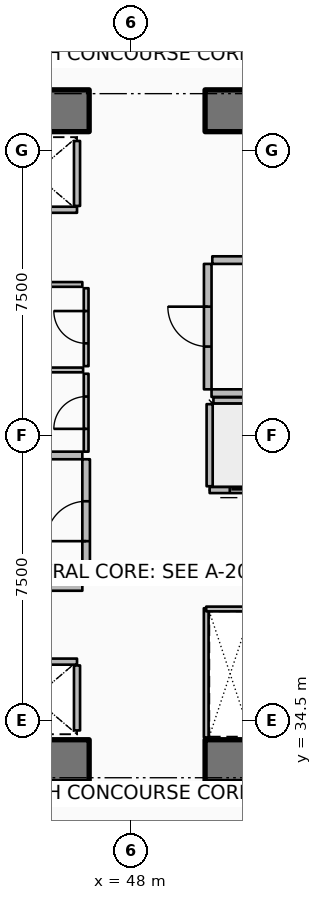
"""IFC4 building model, lengths in metres.
Left out: names, types, materials, properties, quantities, classifications, styles, units other than length and angle.
Written with IfcOpenShell. Run it as: python <this file> out.ifc"""

import sys

from ifc_helpers import new_model, si_unit, direction, frame, frame_2d, origin, place, context, subcontext, project, spatial, rectangle, extrude, element, fill, save


model = new_model("IFC4")
c1 = context("Model", 3, precision=1e-05, world=origin(), true_north=direction((0.0, 1.0)))
c2 = subcontext(c1, "Body", "Model", "MODEL_VIEW")
j1 = project(units=[si_unit("LENGTHUNIT", "METRE"), si_unit("PLANEANGLEUNIT", "RADIAN")], contexts=[c1])
p1 = place(None, origin())
s1 = spatial("IfcSite", under=j1, at=p1, CompositionType="ELEMENT")
p2 = place(p1, origin())
s2 = spatial("IfcBuilding", under=s1, at=p2, CompositionType="ELEMENT")
p3 = place(p2, frame((0.0, 0.0, 12.0)))
s3 = spatial("IfcBuildingStorey", under=s2, at=p3, CompositionType="ELEMENT", Elevation=12.0)
for number, where, z_axis, x_axis in (
    (1, (36.7, 33.45, 0.0), (0.0, 0.0, 1.0), (1.0, 0.0, 0.0)),
    (2, (49.95, 33.45, 0.0), (0.0, 0.0, 1.0), (1.0, 0.0, 0.0)),
    (3, (36.7, 50.55, 0.0), (0.0, 0.0, 1.0), (1.0, 0.0, 0.0)),
    (4, (49.95, 50.55, 0.0), (0.0, 0.0, 1.0), (1.0, 0.0, 0.0)),
):
    element("IfcWall", number, at=place(p3, frame(where, z_axis=z_axis, x_axis=x_axis)), inside=s3, PredefinedType="SHEAR", context=c2, shape_type="SweptSolid", body=[
        extrude(rectangle(XDim=10.2, YDim=1.1, at=frame_2d((5.1, 0.0))), origin(), (0.0, 0.0, 1.0), 4.8),
    ])
p4 = place(p3, frame((46.58, 47.945, 0.0), z_axis=(0.0, 0.0, 1.0), x_axis=(-1.0, 0.0, 0.0)))
e5 = element("IfcWall", 5, at=p4, inside=s3, PredefinedType="PARTITIONING", context=c2, shape_type="SweptSolid", body=[
    extrude(rectangle(XDim=2.26, YDim=0.16, at=frame_2d((1.13, 0.0))), origin(), (0.0, 0.0, 1.0), 4.48),
])
p5 = place(p3, frame((46.58, 48.045, 0.0), z_axis=(0.0, 0.0, 1.0), x_axis=(0.0, 1.0, 0.0)))
e6 = element("IfcWall", 6, at=p5, inside=s3, PredefinedType="PARTITIONING", context=c2, shape_type="SweptSolid", body=[
    extrude(rectangle(XDim=1.71, YDim=0.16, at=frame_2d((0.855, 0.0))), origin(), (0.0, 0.0, 1.0), 4.48),
])
p6 = place(p3, frame((44.32, 36.055, 0.0), z_axis=(0.0, 0.0, 1.0), x_axis=(1.0, 0.0, 0.0)))
e7 = element("IfcWall", 7, at=p6, inside=s3, PredefinedType="PARTITIONING", context=c2, shape_type="SweptSolid", body=[
    extrude(rectangle(XDim=2.26, YDim=0.16, at=frame_2d((1.13, 0.0))), origin(), (0.0, 0.0, 1.0), 4.48),
])
p7 = place(p3, frame((46.58, 34.245, 0.0), z_axis=(0.0, 0.0, 1.0), x_axis=(0.0, 1.0, 0.0)))
e8 = element("IfcWall", 8, at=p7, inside=s3, PredefinedType="PARTITIONING", context=c2, shape_type="SweptSolid", body=[
    extrude(rectangle(XDim=1.71, YDim=0.16, at=frame_2d((0.855, 0.0))), origin(), (0.0, 0.0, 1.0), 4.48),
])
p8 = place(p3, frame((52.23, 40.57, 0.0), z_axis=(0.0, 0.0, 1.0), x_axis=(-1.0, 0.0, 0.0)))
e9 = element("IfcWall", 9, at=p8, inside=s3, PredefinedType="PARTITIONING", context=c2, shape_type="SweptSolid", body=[
    extrude(rectangle(XDim=2.16, YDim=0.16, at=frame_2d((1.08, 0.0))), origin(), (0.0, 0.0, 1.0), 4.48),
])
p9 = place(p8, frame((0.53, 0.0, 0.0)))
e10 = element("IfcOpeningElement", 10, at=p9, cuts=e9, PredefinedType="OPENING", context=c2, shape_type="SweptSolid", body=[
    extrude(rectangle(XDim=1.1, YDim=2.1, at=frame_2d((0.55, 1.05))), frame((0.0, 0.09, 0.0), z_axis=(0.0, -1.0, 0.0), x_axis=(1.0, 0.0, 0.0)), (0.0, 0.0, 1.0), 0.18),
])
p10 = place(p3, frame((50.07, 40.67, 0.0), z_axis=(0.0, 0.0, 1.0), x_axis=(0.0, 1.0, 0.0)))
e11 = element("IfcWall", 11, at=p10, inside=s3, PredefinedType="PARTITIONING", context=c2, shape_type="SweptSolid", body=[
    extrude(rectangle(XDim=2.16, YDim=0.16, at=frame_2d((1.08, 0.0))), origin(), (0.0, 0.0, 1.0), 4.48),
])
p11 = place(p3, frame((50.17, 42.93, 0.0), z_axis=(0.0, 0.0, 1.0), x_axis=(1.0, 0.0, 0.0)))
e12 = element("IfcWall", 12, at=p11, inside=s3, PredefinedType="PARTITIONING", context=c2, shape_type="SweptSolid", body=[
    extrude(rectangle(XDim=1.96, YDim=0.16, at=frame_2d((0.98, 0.0))), origin(), (0.0, 0.0, 1.0), 4.48),
])
p12 = place(p3, frame((41.35, 38.02, 0.0), z_axis=(0.0, 0.0, 1.0), x_axis=(1.0, 0.0, 0.0)))
e13 = element("IfcWall", 13, at=p12, inside=s3, PredefinedType="PARTITIONING", context=c2, shape_type="SweptSolid", body=[
    extrude(rectangle(XDim=5.37, YDim=0.2, at=frame_2d((2.685, 0.0))), origin(), (0.0, 0.0, 1.0), 4.48),
])
p13 = place(p3, frame((43.92, 41.48, 0.0), z_axis=(0.0, 0.0, 1.0), x_axis=(1.0, 0.0, 0.0)))
e14 = element("IfcWall", 14, at=p13, inside=s3, PredefinedType="PARTITIONING", context=c2, shape_type="SweptSolid", body=[
    extrude(rectangle(XDim=2.8, YDim=0.2, at=frame_2d((1.4, 0.0))), origin(), (0.0, 0.0, 1.0), 4.48),
])
p14 = place(p3, frame((46.82, 38.12, 0.0), z_axis=(0.0, 0.0, 1.0), x_axis=(0.0, 1.0, 0.0)))
e15 = element("IfcWall", 15, at=p14, inside=s3, PredefinedType="PARTITIONING", context=c2, shape_type="SweptSolid", body=[
    extrude(rectangle(XDim=3.26, YDim=0.2, at=frame_2d((1.63, 0.0))), origin(), (0.0, 0.0, 1.0), 4.48),
])
p15 = place(p14, frame((1.105, 0.0, 0.0)))
e16 = element("IfcOpeningElement", 16, at=p15, cuts=e15, PredefinedType="OPENING", context=c2, shape_type="SweptSolid", body=[
    extrude(rectangle(XDim=1.05, YDim=2.1, at=frame_2d((0.525, 1.05))), frame((0.0, 0.11, 0.0), z_axis=(0.0, -1.0, 0.0), x_axis=(1.0, 0.0, 0.0)), (0.0, 0.0, 1.0), 0.22),
])
p16 = place(p3, frame((50.12, 43.12, 0.0), z_axis=(0.0, 0.0, 1.0), x_axis=(1.0, 0.0, 0.0)))
e17 = element("IfcWall", 17, at=p16, inside=s3, PredefinedType="PARTITIONING", context=c2, shape_type="SweptSolid", body=[
    extrude(rectangle(XDim=8.88, YDim=0.2, at=frame_2d((4.44, 0.0))), origin(), (0.0, 0.0, 1.0), 4.48),
])
p17 = place(p3, frame((50.14, 46.62, 0.0), z_axis=(0.0, 0.0, 1.0), x_axis=(1.0, 0.0, 0.0)))
e18 = element("IfcWall", 18, at=p17, inside=s3, PredefinedType="PARTITIONING", context=c2, shape_type="SweptSolid", body=[
    extrude(rectangle(XDim=1.02, YDim=0.2, at=frame_2d((0.51, 0.0))), origin(), (0.0, 0.0, 1.0), 4.48),
])
p18 = place(p3, frame((50.02, 43.22, 0.0), z_axis=(0.0, 0.0, 1.0), x_axis=(0.0, 1.0, 0.0)))
e19 = element("IfcWall", 19, at=p18, inside=s3, PredefinedType="PARTITIONING", context=c2, shape_type="SweptSolid", body=[
    extrude(rectangle(XDim=3.3, YDim=0.2, at=frame_2d((1.65, 0.0))), origin(), (0.0, 0.0, 1.0), 4.48),
])
p19 = place(p18, frame((1.125, 0.0, 0.0)))
e20 = element("IfcOpeningElement", 20, at=p19, cuts=e19, PredefinedType="OPENING", context=c2, shape_type="SweptSolid", body=[
    extrude(rectangle(XDim=1.05, YDim=2.1, at=frame_2d((0.525, 1.05))), frame((0.0, 0.11, 0.0), z_axis=(0.0, -1.0, 0.0), x_axis=(1.0, 0.0, 0.0)), (0.0, 0.0, 1.0), 0.22),
])
p20 = place(p3, frame((41.36, 45.98, 0.0), z_axis=(0.0, 0.0, 1.0), x_axis=(1.0, 0.0, 0.0)))
e21 = element("IfcWall", 21, at=p20, inside=s3, PredefinedType="PARTITIONING", context=c2, shape_type="SweptSolid", body=[
    extrude(rectangle(XDim=5.36, YDim=0.125, at=frame_2d((2.68, 0.0))), origin(), (0.0, 0.0, 1.0), 3.92),
])
p21 = place(p3, frame((49.98, 34.06, 0.0), z_axis=(0.0, 0.0, 1.0), x_axis=(0.0, 1.0, 0.0)))
e22 = element("IfcWall", 22, at=p21, inside=s3, PredefinedType="PARTITIONING", context=c2, shape_type="SweptSolid", body=[
    extrude(rectangle(XDim=3.4, YDim=0.125, at=frame_2d((1.7, 0.0))), origin(), (0.0, 0.0, 1.0), 3.92),
])
p22 = place(p3, frame((49.98, 37.44, 0.0), z_axis=(0.0, 0.0, 1.0), x_axis=(1.0, 0.0, 0.0)))
e23 = element("IfcWall", 23, at=p22, inside=s3, PredefinedType="PARTITIONING", context=c2, shape_type="SweptSolid", body=[
    extrude(rectangle(XDim=1.26, YDim=0.125, at=frame_2d((0.63, 0.0))), origin(), (0.0, 0.0, 1.0), 3.92),
])
p23 = place(p3, frame((44.03, 43.73, 0.0), z_axis=(0.0, 0.0, 1.0), x_axis=(1.0, 0.0, 0.0)))
e24 = element("IfcWall", 24, at=p23, inside=s3, PredefinedType="PARTITIONING", context=c2, shape_type="SweptSolid", body=[
    extrude(rectangle(XDim=2.71, YDim=0.125, at=frame_2d((1.355, 0.0))), origin(), (0.0, 0.0, 1.0), 3.92),
])
p24 = place(p3, frame((46.82, 41.58, 0.0), z_axis=(0.0, 0.0, 1.0), x_axis=(0.0, 1.0, 0.0)))
e25 = element("IfcWall", 25, at=p24, inside=s3, PredefinedType="PARTITIONING", context=c2, shape_type="SweptSolid", body=[
    extrude(rectangle(XDim=2.05, YDim=0.125, at=frame_2d((1.025, 0.0))), origin(), (0.0, 0.0, 1.0), 3.92),
])
p25 = place(p24, frame((0.6, 0.0, 0.0)))
e26 = element("IfcOpeningElement", 26, at=p25, cuts=e25, PredefinedType="OPENING", context=c2, shape_type="SweptSolid", body=[
    extrude(rectangle(XDim=0.85, YDim=2.06, at=frame_2d((0.425, 1.03))), frame((0.0, 0.073, 0.0), z_axis=(0.0, -1.0, 0.0), x_axis=(1.0, 0.0, 0.0)), (0.0, 0.0, 1.0), 0.145),
])
p26 = place(p3, frame((46.82, 43.83, 0.0), z_axis=(0.0, 0.0, 1.0), x_axis=(0.0, 1.0, 0.0)))
e27 = element("IfcWall", 27, at=p26, inside=s3, PredefinedType="PARTITIONING", context=c2, shape_type="SweptSolid", body=[
    extrude(rectangle(XDim=2.05, YDim=0.125, at=frame_2d((1.025, 0.0))), origin(), (0.0, 0.0, 1.0), 3.92),
])
p27 = place(p26, frame((0.6, 0.0, 0.0)))
e28 = element("IfcOpeningElement", 28, at=p27, cuts=e27, PredefinedType="OPENING", context=c2, shape_type="SweptSolid", body=[
    extrude(rectangle(XDim=0.85, YDim=2.06, at=frame_2d((0.425, 1.03))), frame((0.0, 0.073, 0.0), z_axis=(0.0, -1.0, 0.0), x_axis=(1.0, 0.0, 0.0)), (0.0, 0.0, 1.0), 0.145),
])
p28 = place(p9, origin())
e29 = element("IfcDoor", 29, at=p28, inside=s3, OperationType="DOUBLE_DOOR_SLIDING", PredefinedType="DOOR", context=c2, shape_type="SweptSolid", body=[
    extrude(rectangle(XDim=1.1, YDim=2.1, at=frame_2d((0.55, 1.05))), frame((0.0, 0.025, 0.0), z_axis=(0.0, -1.0, 0.0), x_axis=(1.0, 0.0, 0.0)), (0.0, 0.0, 1.0), 0.05),
])
fill(e10, e29)
p29 = place(p15, origin())
e30 = element("IfcDoor", 30, at=p29, inside=s3, OperationType="SINGLE_SWING_LEFT", PredefinedType="DOOR", context=c2, shape_type="SweptSolid", body=[
    extrude(rectangle(XDim=1.05, YDim=2.1, at=frame_2d((0.525, 1.05))), frame((0.0, 0.025, 0.0), z_axis=(0.0, -1.0, 0.0), x_axis=(1.0, 0.0, 0.0)), (0.0, 0.0, 1.0), 0.05),
])
fill(e16, e30)
p30 = place(p19, origin())
e31 = element("IfcDoor", 31, at=p30, inside=s3, OperationType="SINGLE_SWING_RIGHT", PredefinedType="DOOR", context=c2, shape_type="SweptSolid", body=[
    extrude(rectangle(XDim=1.05, YDim=2.1, at=frame_2d((0.525, 1.05))), frame((0.0, 0.025, 0.0), z_axis=(0.0, -1.0, 0.0), x_axis=(1.0, 0.0, 0.0)), (0.0, 0.0, 1.0), 0.05),
])
fill(e20, e31)
p31 = place(p25, origin())
e32 = element("IfcDoor", 32, at=p31, inside=s3, OperationType="SINGLE_SWING_LEFT", PredefinedType="DOOR", context=c2, shape_type="SweptSolid", body=[
    extrude(rectangle(XDim=0.85, YDim=2.06, at=frame_2d((0.425, 1.03))), frame((0.0, 0.025, 0.0), z_axis=(0.0, -1.0, 0.0), x_axis=(1.0, 0.0, 0.0)), (0.0, 0.0, 1.0), 0.05),
])
fill(e26, e32)
p32 = place(p27, origin())
e33 = element("IfcDoor", 33, at=p32, inside=s3, OperationType="SINGLE_SWING_RIGHT", PredefinedType="DOOR", context=c2, shape_type="SweptSolid", body=[
    extrude(rectangle(XDim=0.85, YDim=2.06, at=frame_2d((0.425, 1.03))), frame((0.0, 0.025, 0.0), z_axis=(0.0, -1.0, 0.0), x_axis=(1.0, 0.0, 0.0)), (0.0, 0.0, 1.0), 0.05),
])
fill(e28, e33)
save(model, sys.argv[1])
